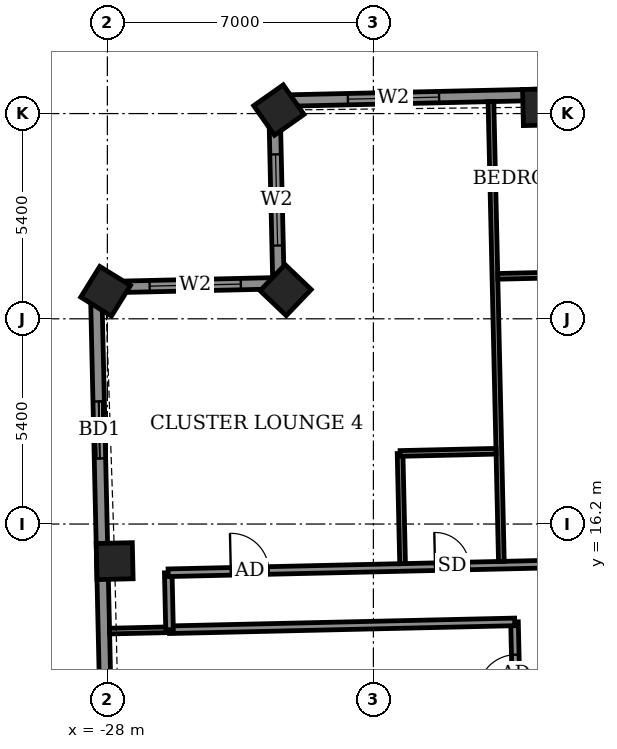
"""IFC4 building model, lengths in metres.
Left out: names, types, materials, properties, quantities, classifications, styles, units other than length and angle.
Written with IfcOpenShell. Run it as: python <this file> out.ifc"""

import sys

from ifc_helpers import new_model, si_unit, direction, frame, frame_2d, origin, origin_2d, place, context, subcontext, project, spatial, rectangle, extrude, element, fill, save


model = new_model("IFC4")
c1 = context("Model", 3, precision=1e-05, world=origin(), true_north=direction((0.0, 1.0)))
c2 = subcontext(c1, "Body", "Model", "MODEL_VIEW")
j1 = project(units=[si_unit("LENGTHUNIT", "METRE"), si_unit("PLANEANGLEUNIT", "RADIAN")], contexts=[c1])
p1 = place(None, origin())
s1 = spatial("IfcSite", under=j1, at=p1, CompositionType="ELEMENT")
p2 = place(p1, origin())
s2 = spatial("IfcBuilding", under=s1, at=p2, CompositionType="ELEMENT")
p3 = place(p2, frame((0.0, 0.0, 287.1)))
s3 = spatial("IfcBuildingStorey", under=s2, at=p3, CompositionType="ELEMENT", Elevation=287.1)
for number, where, z_axis, x_axis in (
    (1, (-16.589, 27.169, -0.55), (0.0, 0.0, 1.0), (-1.0, -0.023, 0.0)),
    (2, (-23.488, 27.093, -0.55), (0.0, 0.0, 1.0), (-0.818, -0.575, 0.0)),
    (3, (-23.309, 22.355, -0.55), (0.0, 0.0, 1.0), (-0.691, -0.723, 0.0)),
    (4, (-28.046, 22.324, -0.55), (0.0, 0.0, 1.0), (-0.527, -0.85, 0.0)),
    (5, (-27.808, 15.224, -0.55), (0.0, 0.0, 1.0), (0.023, -1.0, 0.0)),
):
    element("IfcColumn", number, at=place(p3, frame(where, z_axis=z_axis, x_axis=x_axis)), inside=s3, PredefinedType="COLUMN", context=c2, shape_type="SweptSolid", body=[
        extrude(rectangle(XDim=0.95, YDim=0.95, at=origin_2d()), origin(), (0.0, 0.0, 1.0), 3.6),
    ])
p4 = place(p3, frame((26.216, 28.465, 0.0), z_axis=(0.0, 0.0, 1.0), x_axis=(-0.999742843677, -0.022677004157, 0.0)))
e6 = element("IfcWall", 6, at=p4, inside=s3, PredefinedType="SOLIDWALL", context=c2, shape_type="SweptSolid", body=[
    extrude(rectangle(XDim=49.836, YDim=0.3, at=frame_2d((24.918, 0.0))), origin(), (0.0, 0.0, 1.0), 2.5),
])
p5 = place(p4, frame((0.938, 0.0, 0.0)))
e7 = element("IfcOpeningElement", 7, at=p5, cuts=e6, PredefinedType="OPENING", context=c2, shape_type="SweptSolid", body=[
    extrude(rectangle(XDim=1.5, YDim=2.4, at=frame_2d((0.75, 1.2))), frame((0.0, 0.16, 0.0), z_axis=(0.0, -1.0, 0.0), x_axis=(1.0, 0.0, 0.0)), (0.0, 0.0, 1.0), 0.32),
])
p6 = place(p4, frame((4.087, 0.0, 0.0)))
e8 = element("IfcOpeningElement", 8, at=p6, cuts=e6, PredefinedType="OPENING", context=c2, shape_type="SweptSolid", body=[
    extrude(rectangle(XDim=1.5, YDim=2.4, at=frame_2d((0.75, 1.2))), frame((0.0, 0.16, 0.0), z_axis=(0.0, -1.0, 0.0), x_axis=(1.0, 0.0, 0.0)), (0.0, 0.0, 1.0), 0.32),
])
p7 = place(p4, frame((8.711, 0.0, 0.0)))
e9 = element("IfcOpeningElement", 9, at=p7, cuts=e6, PredefinedType="OPENING", context=c2, shape_type="SweptSolid", body=[
    extrude(rectangle(XDim=1.5, YDim=2.4, at=frame_2d((0.75, 1.2))), frame((0.0, 0.16, 0.0), z_axis=(0.0, -1.0, 0.0), x_axis=(1.0, 0.0, 0.0)), (0.0, 0.0, 1.0), 0.32),
])
p8 = place(p4, frame((12.067, 0.0, 0.0)))
e10 = element("IfcOpeningElement", 10, at=p8, cuts=e6, PredefinedType="OPENING", context=c2, shape_type="SweptSolid", body=[
    extrude(rectangle(XDim=1.5, YDim=2.4, at=frame_2d((0.75, 1.2))), frame((0.0, 0.16, 0.0), z_axis=(0.0, -1.0, 0.0), x_axis=(1.0, 0.0, 0.0)), (0.0, 0.0, 1.0), 0.32),
])
p9 = place(p4, frame((17.836, 0.0, 0.0)))
e11 = element("IfcOpeningElement", 11, at=p9, cuts=e6, PredefinedType="OPENING", context=c2, shape_type="SweptSolid", body=[
    extrude(rectangle(XDim=1.5, YDim=2.4, at=frame_2d((0.75, 1.2))), frame((0.0, 0.16, 0.0), z_axis=(0.0, -1.0, 0.0), x_axis=(1.0, 0.0, 0.0)), (0.0, 0.0, 1.0), 0.32),
])
p10 = place(p4, frame((22.849, 0.0, 0.0)))
e12 = element("IfcOpeningElement", 12, at=p10, cuts=e6, PredefinedType="OPENING", context=c2, shape_type="SweptSolid", body=[
    extrude(rectangle(XDim=1.5, YDim=2.4, at=frame_2d((0.75, 1.2))), frame((0.0, 0.16, 0.0), z_axis=(0.0, -1.0, 0.0), x_axis=(1.0, 0.0, 0.0)), (0.0, 0.0, 1.0), 0.32),
])
p11 = place(p4, frame((26.205, 0.0, 0.0)))
e13 = element("IfcOpeningElement", 13, at=p11, cuts=e6, PredefinedType="OPENING", context=c2, shape_type="SweptSolid", body=[
    extrude(rectangle(XDim=1.5, YDim=2.4, at=frame_2d((0.75, 1.2))), frame((0.0, 0.16, 0.0), z_axis=(0.0, -1.0, 0.0), x_axis=(1.0, 0.0, 0.0)), (0.0, 0.0, 1.0), 0.32),
])
p12 = place(p4, frame((32.011, 0.0, 0.0)))
e14 = element("IfcOpeningElement", 14, at=p12, cuts=e6, PredefinedType="OPENING", context=c2, shape_type="SweptSolid", body=[
    extrude(rectangle(XDim=1.5, YDim=2.4, at=frame_2d((0.75, 1.2))), frame((0.0, 0.16, 0.0), z_axis=(0.0, -1.0, 0.0), x_axis=(1.0, 0.0, 0.0)), (0.0, 0.0, 1.0), 0.32),
])
p13 = place(p4, frame((37.011, 0.0, 0.0)))
e15 = element("IfcOpeningElement", 15, at=p13, cuts=e6, PredefinedType="OPENING", context=c2, shape_type="SweptSolid", body=[
    extrude(rectangle(XDim=1.5, YDim=2.4, at=frame_2d((0.75, 1.2))), frame((0.0, 0.16, 0.0), z_axis=(0.0, -1.0, 0.0), x_axis=(1.0, 0.0, 0.0)), (0.0, 0.0, 1.0), 0.32),
])
p14 = place(p4, frame((40.367, 0.0, 0.0)))
e16 = element("IfcOpeningElement", 16, at=p14, cuts=e6, PredefinedType="OPENING", context=c2, shape_type="SweptSolid", body=[
    extrude(rectangle(XDim=1.5, YDim=2.4, at=frame_2d((0.75, 1.2))), frame((0.0, 0.16, 0.0), z_axis=(0.0, -1.0, 0.0), x_axis=(1.0, 0.0, 0.0)), (0.0, 0.0, 1.0), 0.32),
])
p15 = place(p4, frame((45.499, 0.0, 0.9)))
e17 = element("IfcOpeningElement", 17, at=p15, cuts=e6, PredefinedType="OPENING", context=c2, shape_type="SweptSolid", body=[
    extrude(rectangle(XDim=2.4, YDim=1.5, at=frame_2d((1.2, 0.75))), frame((0.0, 0.16, 0.0), z_axis=(0.0, -1.0, 0.0), x_axis=(1.0, 0.0, 0.0)), (0.0, 0.0, 1.0), 0.32),
])
p16 = place(p3, frame((-23.607, 27.335, 0.0), z_axis=(0.0, 0.0, 1.0), x_axis=(0.022683280499, -0.999742701292, 0.0)))
e18 = element("IfcWall", 18, at=p16, inside=s3, PredefinedType="SOLIDWALL", context=c2, shape_type="SweptSolid", body=[
    extrude(rectangle(XDim=4.8, YDim=0.3, at=frame_2d((2.4, 0.0))), origin(), (0.0, 0.0, 1.0), 2.55),
])
p17 = place(p16, frame((1.409, 0.0, 0.9)))
e19 = element("IfcOpeningElement", 19, at=p17, cuts=e18, PredefinedType="OPENING", context=c2, shape_type="SweptSolid", body=[
    extrude(rectangle(XDim=2.4, YDim=1.5, at=frame_2d((1.2, 0.75))), frame((0.0, 0.16, 0.0), z_axis=(0.0, -1.0, 0.0), x_axis=(1.0, 0.0, 0.0)), (0.0, 0.0, 1.0), 0.32),
])
p18 = place(p3, frame((-23.498, 22.536, 0.0), z_axis=(0.0, 0.0, 1.0), x_axis=(-0.999742701292, -0.022683280499, 0.0)))
e20 = element("IfcWall", 20, at=p18, inside=s3, PredefinedType="SOLIDWALL", context=c2, shape_type="SweptSolid", body=[
    extrude(rectangle(XDim=4.8, YDim=0.3, at=frame_2d((2.4, 0.0))), origin(), (0.0, 0.0, 1.0), 2.55),
])
p19 = place(p18, frame((0.99, 0.0, 0.9)))
e21 = element("IfcOpeningElement", 21, at=p19, cuts=e20, PredefinedType="OPENING", context=c2, shape_type="SweptSolid", body=[
    extrude(rectangle(XDim=2.4, YDim=1.5, at=frame_2d((1.2, 0.75))), frame((0.0, 0.16, 0.0), z_axis=(0.0, -1.0, 0.0), x_axis=(1.0, 0.0, 0.0)), (0.0, 0.0, 1.0), 0.32),
])
p20 = place(p3, frame((-28.297, 22.427, 0.0), z_axis=(0.0, 0.0, 1.0), x_axis=(0.022663916124, -0.999743140465, 0.0)))
e22 = element("IfcWall", 22, at=p20, inside=s3, PredefinedType="SOLIDWALL", context=c2, shape_type="SweptSolid", body=[
    extrude(rectangle(XDim=15.049, YDim=0.3, at=frame_2d((7.524, 0.0))), origin(), (0.0, 0.0, 1.0), 2.5),
])
p21 = place(p20, frame((3.002, 0.0, 0.0)))
e23 = element("IfcOpeningElement", 23, at=p21, cuts=e22, PredefinedType="OPENING", context=c2, shape_type="SweptSolid", body=[
    extrude(rectangle(XDim=1.5, YDim=2.4, at=frame_2d((0.75, 1.2))), frame((0.0, 0.16, 0.0), z_axis=(0.0, -1.0, 0.0), x_axis=(1.0, 0.0, 0.0)), (0.0, 0.0, 1.0), 0.32),
])
p22 = place(p20, frame((10.475, 0.0, 0.9)))
e24 = element("IfcOpeningElement", 24, at=p22, cuts=e22, PredefinedType="OPENING", context=c2, shape_type="SweptSolid", body=[
    extrude(rectangle(XDim=2.4, YDim=1.5, at=frame_2d((1.2, 0.75))), frame((0.0, 0.16, 0.0), z_axis=(0.0, -1.0, 0.0), x_axis=(1.0, 0.0, 0.0)), (0.0, 0.0, 1.0), 0.32),
])
p23 = place(p3, frame((-16.684, -12.919, 0.0), z_axis=(0.0, 0.0, 1.0), x_axis=(-0.022712214871, 0.999742044377, 0.0)))
e25 = element("IfcWall", 25, at=p23, inside=s3, PredefinedType="PARTITIONING", context=c2, shape_type="SweptSolid", body=[
    extrude(rectangle(XDim=26.551, YDim=0.2, at=frame_2d((13.275, 0.0))), origin(), (0.0, 0.0, 1.0), 3.05),
])
p24 = place(p23, frame((24.688, 0.0, 0.0)))
e26 = element("IfcOpeningElement", 26, at=p24, cuts=e25, PredefinedType="OPENING", context=c2, shape_type="SweptSolid", body=[
    extrude(rectangle(XDim=1.0, YDim=2.1, at=frame_2d((0.5, 1.05))), frame((0.0, 0.11, 0.0), z_axis=(0.0, -1.0, 0.0), x_axis=(1.0, 0.0, 0.0)), (0.0, 0.0, 1.0), 0.22),
])
p25 = place(p23, frame((21.975, 0.0, 0.0)))
e27 = element("IfcOpeningElement", 27, at=p25, cuts=e25, PredefinedType="OPENING", context=c2, shape_type="SweptSolid", body=[
    extrude(rectangle(XDim=0.9, YDim=2.1, at=frame_2d((0.45, 1.05))), frame((0.0, 0.11, 0.0), z_axis=(0.0, -1.0, 0.0), x_axis=(1.0, 0.0, 0.0)), (0.0, 0.0, 1.0), 0.22),
])
p26 = place(p23, frame((16.875, 0.0, 0.0)))
e28 = element("IfcOpeningElement", 28, at=p26, cuts=e25, PredefinedType="OPENING", context=c2, shape_type="SweptSolid", body=[
    extrude(rectangle(XDim=1.0, YDim=2.1, at=frame_2d((0.5, 1.05))), frame((0.0, 0.11, 0.0), z_axis=(0.0, -1.0, 0.0), x_axis=(1.0, 0.0, 0.0)), (0.0, 0.0, 1.0), 0.22),
])
p27 = place(p23, frame((19.375, 0.0, 0.0)))
e29 = element("IfcOpeningElement", 29, at=p27, cuts=e25, PredefinedType="OPENING", context=c2, shape_type="SweptSolid", body=[
    extrude(rectangle(XDim=0.9, YDim=2.1, at=frame_2d((0.45, 1.05))), frame((0.0, 0.11, 0.0), z_axis=(0.0, -1.0, 0.0), x_axis=(1.0, 0.0, 0.0)), (0.0, 0.0, 1.0), 0.22),
])
p28 = place(p23, frame((14.05, 0.0, 0.0)))
e30 = element("IfcOpeningElement", 30, at=p28, cuts=e25, PredefinedType="OPENING", context=c2, shape_type="SweptSolid", body=[
    extrude(rectangle(XDim=1.0, YDim=2.1, at=frame_2d((0.5, 1.05))), frame((0.0, 0.11, 0.0), z_axis=(0.0, -1.0, 0.0), x_axis=(1.0, 0.0, 0.0)), (0.0, 0.0, 1.0), 0.22),
])
p29 = place(p23, frame((11.225, 0.0, 0.0)))
e31 = element("IfcOpeningElement", 31, at=p29, cuts=e25, PredefinedType="OPENING", context=c2, shape_type="SweptSolid", body=[
    extrude(rectangle(XDim=0.9, YDim=2.1, at=frame_2d((0.45, 1.05))), frame((0.0, 0.11, 0.0), z_axis=(0.0, -1.0, 0.0), x_axis=(1.0, 0.0, 0.0)), (0.0, 0.0, 1.0), 0.22),
])
p30 = place(p23, frame((8.37, 0.0, 0.0)))
e32 = element("IfcOpeningElement", 32, at=p30, cuts=e25, PredefinedType="OPENING", context=c2, shape_type="SweptSolid", body=[
    extrude(rectangle(XDim=1.0, YDim=2.1, at=frame_2d((0.5, 1.05))), frame((0.0, 0.11, 0.0), z_axis=(0.0, -1.0, 0.0), x_axis=(1.0, 0.0, 0.0)), (0.0, 0.0, 1.0), 0.22),
])
p31 = place(p23, frame((5.263, 0.0, 0.0)))
e33 = element("IfcOpeningElement", 33, at=p31, cuts=e25, PredefinedType="OPENING", context=c2, shape_type="SweptSolid", body=[
    extrude(rectangle(XDim=1.0, YDim=2.1, at=frame_2d((0.5, 1.05))), frame((0.0, 0.11, 0.0), z_axis=(0.0, -1.0, 0.0), x_axis=(1.0, 0.0, 0.0)), (0.0, 0.0, 1.0), 0.22),
])
p32 = place(p23, frame((0.425, 0.0, 0.0)))
e34 = element("IfcOpeningElement", 34, at=p32, cuts=e25, PredefinedType="OPENING", context=c2, shape_type="SweptSolid", body=[
    extrude(rectangle(XDim=1.0, YDim=2.1, at=frame_2d((0.5, 1.05))), frame((0.0, 0.11, 0.0), z_axis=(0.0, -1.0, 0.0), x_axis=(1.0, 0.0, 0.0)), (0.0, 0.0, 1.0), 0.22),
])
p33 = place(p23, frame((2.6, 0.0, 0.0)))
e35 = element("IfcOpeningElement", 35, at=p33, cuts=e25, PredefinedType="OPENING", context=c2, shape_type="SweptSolid", body=[
    extrude(rectangle(XDim=0.9, YDim=2.1, at=frame_2d((0.45, 1.05))), frame((0.0, 0.11, 0.0), z_axis=(0.0, -1.0, 0.0), x_axis=(1.0, 0.0, 0.0)), (0.0, 0.0, 1.0), 0.22),
])
p34 = place(p3, frame((-27.942, 13.383, 0.0), z_axis=(0.0, 0.0, 1.0), x_axis=(0.999741755729, 0.022724916977, 0.0)))
e36 = element("IfcWall", 36, at=p34, inside=s3, PredefinedType="PARTITIONING", context=c2, shape_type="SweptSolid", body=[
    extrude(rectangle(XDim=1.579, YDim=0.15, at=frame_2d((0.79, 0.0))), origin(), (0.0, 0.0, 1.0), 2.5),
])
p35 = place(p3, frame((-26.367, 13.419, 0.0), z_axis=(0.0, 0.0, 1.0), x_axis=(0.999742888587, 0.022675024131, 0.0)))
e37 = element("IfcWall", 37, at=p35, inside=s3, PredefinedType="PARTITIONING", context=c2, shape_type="SweptSolid", body=[
    extrude(rectangle(XDim=9.087, YDim=0.2, at=frame_2d((4.544, 0.0))), origin(), (0.0, 0.0, 1.0), 3.05),
])
p36 = place(p3, frame((-26.364, 13.419, 0.0), z_axis=(0.0, 0.0, 1.0), x_axis=(-0.022632637625, 0.99974384905, 0.0)))
e38 = element("IfcWall", 38, at=p36, inside=s3, PredefinedType="PARTITIONING", context=c2, shape_type="SweptSolid", body=[
    extrude(rectangle(XDim=1.5, YDim=0.2, at=frame_2d((0.75, 0.0))), origin(), (0.0, 0.0, 1.0), 3.05),
])
p37 = place(p3, frame((-26.401, 14.918, 0.0), z_axis=(0.0, 0.0, 1.0), x_axis=(0.99974239733, 0.022696673341, 0.0)))
e39 = element("IfcWall", 39, at=p37, inside=s3, PredefinedType="PARTITIONING", context=c2, shape_type="SweptSolid", body=[
    extrude(rectangle(XDim=55.386, YDim=0.2, at=frame_2d((27.693, 0.0))), origin(), (0.0, 0.0, 1.0), 3.05),
])
p38 = place(p37, frame((52.889, 0.0, 0.0)))
e40 = element("IfcOpeningElement", 40, at=p38, cuts=e39, PredefinedType="OPENING", context=c2, shape_type="SweptSolid", body=[
    extrude(rectangle(XDim=1.0, YDim=2.1, at=frame_2d((0.5, 1.05))), frame((0.0, 0.11, 0.0), z_axis=(0.0, -1.0, 0.0), x_axis=(1.0, 0.0, 0.0)), (0.0, 0.0, 1.0), 0.22),
])
p39 = place(p37, frame((48.6, 0.0, 0.0)))
e41 = element("IfcOpeningElement", 41, at=p39, cuts=e39, PredefinedType="OPENING", context=c2, shape_type="SweptSolid", body=[
    extrude(rectangle(XDim=0.9, YDim=2.1, at=frame_2d((0.45, 1.05))), frame((0.0, 0.11, 0.0), z_axis=(0.0, -1.0, 0.0), x_axis=(1.0, 0.0, 0.0)), (0.0, 0.0, 1.0), 0.22),
])
p40 = place(p37, frame((41.8, 0.0, 0.0)))
e42 = element("IfcOpeningElement", 42, at=p40, cuts=e39, PredefinedType="OPENING", context=c2, shape_type="SweptSolid", body=[
    extrude(rectangle(XDim=0.9, YDim=2.1, at=frame_2d((0.45, 1.05))), frame((0.0, 0.11, 0.0), z_axis=(0.0, -1.0, 0.0), x_axis=(1.0, 0.0, 0.0)), (0.0, 0.0, 1.0), 0.22),
])
p41 = place(p37, frame((39.675, 0.0, 0.0)))
e43 = element("IfcOpeningElement", 43, at=p41, cuts=e39, PredefinedType="OPENING", context=c2, shape_type="SweptSolid", body=[
    extrude(rectangle(XDim=0.9, YDim=2.1, at=frame_2d((0.45, 1.05))), frame((0.0, 0.11, 0.0), z_axis=(0.0, -1.0, 0.0), x_axis=(1.0, 0.0, 0.0)), (0.0, 0.0, 1.0), 0.22),
])
p42 = place(p37, frame((32.675, 0.0, 0.0)))
e44 = element("IfcOpeningElement", 44, at=p42, cuts=e39, PredefinedType="OPENING", context=c2, shape_type="SweptSolid", body=[
    extrude(rectangle(XDim=0.9, YDim=2.1, at=frame_2d((0.45, 1.05))), frame((0.0, 0.11, 0.0), z_axis=(0.0, -1.0, 0.0), x_axis=(1.0, 0.0, 0.0)), (0.0, 0.0, 1.0), 0.22),
])
p43 = place(p37, frame((30.4, 0.0, 0.0)))
e45 = element("IfcOpeningElement", 45, at=p43, cuts=e39, PredefinedType="OPENING", context=c2, shape_type="SweptSolid", body=[
    extrude(rectangle(XDim=0.9, YDim=2.1, at=frame_2d((0.45, 1.05))), frame((0.0, 0.11, 0.0), z_axis=(0.0, -1.0, 0.0), x_axis=(1.0, 0.0, 0.0)), (0.0, 0.0, 1.0), 0.22),
])
p44 = place(p37, frame((23.225, 0.0, 0.0)))
e46 = element("IfcOpeningElement", 46, at=p44, cuts=e39, PredefinedType="OPENING", context=c2, shape_type="SweptSolid", body=[
    extrude(rectangle(XDim=0.9, YDim=2.1, at=frame_2d((0.45, 1.05))), frame((0.0, 0.11, 0.0), z_axis=(0.0, -1.0, 0.0), x_axis=(1.0, 0.0, 0.0)), (0.0, 0.0, 1.0), 0.22),
])
p45 = place(p37, frame((20.9, 0.0, 0.0)))
e47 = element("IfcOpeningElement", 47, at=p45, cuts=e39, PredefinedType="OPENING", context=c2, shape_type="SweptSolid", body=[
    extrude(rectangle(XDim=0.9, YDim=2.1, at=frame_2d((0.45, 1.05))), frame((0.0, 0.11, 0.0), z_axis=(0.0, -1.0, 0.0), x_axis=(1.0, 0.0, 0.0)), (0.0, 0.0, 1.0), 0.22),
])
p46 = place(p37, frame((13.9, 0.0, 0.0)))
e48 = element("IfcOpeningElement", 48, at=p46, cuts=e39, PredefinedType="OPENING", context=c2, shape_type="SweptSolid", body=[
    extrude(rectangle(XDim=0.9, YDim=2.1, at=frame_2d((0.45, 1.05))), frame((0.0, 0.11, 0.0), z_axis=(0.0, -1.0, 0.0), x_axis=(1.0, 0.0, 0.0)), (0.0, 0.0, 1.0), 0.22),
])
p47 = place(p37, frame((11.775, 0.0, 0.0)))
e49 = element("IfcOpeningElement", 49, at=p47, cuts=e39, PredefinedType="OPENING", context=c2, shape_type="SweptSolid", body=[
    extrude(rectangle(XDim=0.9, YDim=2.1, at=frame_2d((0.45, 1.05))), frame((0.0, 0.11, 0.0), z_axis=(0.0, -1.0, 0.0), x_axis=(1.0, 0.0, 0.0)), (0.0, 0.0, 1.0), 0.22),
])
p48 = place(p37, frame((1.65, 0.0, 0.0)))
e50 = element("IfcOpeningElement", 50, at=p48, cuts=e39, PredefinedType="OPENING", context=c2, shape_type="SweptSolid", body=[
    extrude(rectangle(XDim=1.0, YDim=2.1, at=frame_2d((0.5, 1.05))), frame((0.0, 0.11, 0.0), z_axis=(0.0, -1.0, 0.0), x_axis=(1.0, 0.0, 0.0)), (0.0, 0.0, 1.0), 0.22),
])
p49 = place(p37, frame((7.025, 0.0, 0.0)))
e51 = element("IfcOpeningElement", 51, at=p49, cuts=e39, PredefinedType="OPENING", context=c2, shape_type="SweptSolid", body=[
    extrude(rectangle(XDim=0.9, YDim=2.1, at=frame_2d((0.45, 1.05))), frame((0.0, 0.11, 0.0), z_axis=(0.0, -1.0, 0.0), x_axis=(1.0, 0.0, 0.0)), (0.0, 0.0, 1.0), 0.22),
])
p50 = place(p3, frame((-20.232, 15.158, 0.0), z_axis=(0.0, 0.0, 1.0), x_axis=(-0.022817032779, 0.999739657619, 0.0)))
e52 = element("IfcWall", 52, at=p50, inside=s3, PredefinedType="PARTITIONING", context=c2, shape_type="SweptSolid", body=[
    extrude(rectangle(XDim=2.9, YDim=0.15, at=frame_2d((1.45, 0.0))), origin(), (0.0, 0.0, 1.0), 3.05),
])
p51 = place(p3, frame((-17.633, 15.217, 0.0), z_axis=(0.0, 0.0, 1.0), x_axis=(-0.02263844782, 0.9997437175, 0.0)))
e53 = element("IfcWall", 53, at=p51, inside=s3, PredefinedType="PARTITIONING", context=c2, shape_type="SweptSolid", body=[
    extrude(rectangle(XDim=12.1, YDim=0.15, at=frame_2d((6.05, 0.0))), origin(), (0.0, 0.0, 1.0), 2.55),
])
p52 = place(p3, frame((-20.296, 18.057, 0.0), z_axis=(0.0, 0.0, 1.0), x_axis=(0.999735102249, 0.023015762656, 0.0)))
e54 = element("IfcWall", 54, at=p52, inside=s3, PredefinedType="PARTITIONING", context=c2, shape_type="SweptSolid", body=[
    extrude(rectangle(XDim=2.525, YDim=0.15, at=frame_2d((1.262, 0.0))), origin(), (0.0, 0.0, 1.0), 3.05),
])
p53 = place(p3, frame((-17.726, 22.717, 0.0), z_axis=(0.0, 0.0, 1.0), x_axis=(0.999740260747, 0.02279059109, 0.0)))
e55 = element("IfcWall", 55, at=p53, inside=s3, PredefinedType="PARTITIONING", context=c2, shape_type="SweptSolid", body=[
    extrude(rectangle(XDim=2.324, YDim=0.15, at=frame_2d((1.162, 0.0))), origin(), (0.0, 0.0, 1.0), 3.05),
])
p54 = place(p15, origin())
e56 = element("IfcWindow", 56, at=p54, inside=s3, PartitioningType="DOUBLE_PANEL_VERTICAL", PredefinedType="WINDOW", context=c2, shape_type="SweptSolid", body=[
    extrude(rectangle(XDim=2.4, YDim=1.5, at=frame_2d((1.2, 0.75))), frame((0.0, 0.03, 0.0), z_axis=(0.0, -1.0, 0.0), x_axis=(1.0, 0.0, 0.0)), (0.0, 0.0, 1.0), 0.06),
])
fill(e17, e56)
p55 = place(p17, origin())
e57 = element("IfcWindow", 57, at=p55, inside=s3, PartitioningType="DOUBLE_PANEL_VERTICAL", PredefinedType="WINDOW", context=c2, shape_type="SweptSolid", body=[
    extrude(rectangle(XDim=2.4, YDim=1.5, at=frame_2d((1.2, 0.75))), frame((0.0, 0.03, 0.0), z_axis=(0.0, -1.0, 0.0), x_axis=(1.0, 0.0, 0.0)), (0.0, 0.0, 1.0), 0.06),
])
fill(e19, e57)
p56 = place(p19, origin())
e58 = element("IfcWindow", 58, at=p56, inside=s3, PartitioningType="DOUBLE_PANEL_VERTICAL", PredefinedType="WINDOW", context=c2, shape_type="SweptSolid", body=[
    extrude(rectangle(XDim=2.4, YDim=1.5, at=frame_2d((1.2, 0.75))), frame((0.0, 0.03, 0.0), z_axis=(0.0, -1.0, 0.0), x_axis=(1.0, 0.0, 0.0)), (0.0, 0.0, 1.0), 0.06),
])
fill(e21, e58)
p57 = place(p21, origin())
e59 = element("IfcDoor", 59, at=p57, inside=s3, OperationType="SLIDING_TO_LEFT", PredefinedType="DOOR", context=c2, shape_type="SweptSolid", body=[
    extrude(rectangle(XDim=1.5, YDim=2.4, at=frame_2d((0.75, 1.2))), frame((0.0, 0.025, 0.0), z_axis=(0.0, -1.0, 0.0), x_axis=(1.0, 0.0, 0.0)), (0.0, 0.0, 1.0), 0.05),
])
fill(e23, e59)
p58 = place(p48, origin())
e60 = element("IfcDoor", 60, at=p58, inside=s3, OperationType="SINGLE_SWING_RIGHT", PredefinedType="DOOR", context=c2, shape_type="SweptSolid", body=[
    extrude(rectangle(XDim=1.0, YDim=2.1, at=frame_2d((0.5, 1.05))), frame((0.0, 0.025, 0.0), z_axis=(0.0, -1.0, 0.0), x_axis=(1.0, 0.0, 0.0)), (0.0, 0.0, 1.0), 0.05),
])
fill(e50, e60)
p59 = place(p49, origin())
e61 = element("IfcDoor", 61, at=p59, inside=s3, OperationType="SINGLE_SWING_LEFT", PredefinedType="DOOR", context=c2, shape_type="SweptSolid", body=[
    extrude(rectangle(XDim=0.9, YDim=2.1, at=frame_2d((0.45, 1.05))), frame((0.0, 0.025, 0.0), z_axis=(0.0, -1.0, 0.0), x_axis=(1.0, 0.0, 0.0)), (0.0, 0.0, 1.0), 0.05),
])
fill(e51, e61)
p60 = place(p24, origin())
e62 = element("IfcDoor", 62, at=p60, inside=s3, OperationType="SINGLE_SWING_LEFT", PredefinedType="DOOR", context=c2, shape_type="SweptSolid", body=[
    extrude(rectangle(XDim=1.0, YDim=2.1, at=frame_2d((0.5, 1.05))), frame((0.0, 0.025, 0.0), z_axis=(0.0, -1.0, 0.0), x_axis=(1.0, 0.0, 0.0)), (0.0, 0.0, 1.0), 0.05),
])
fill(e26, e62)
save(model, sys.argv[1])
